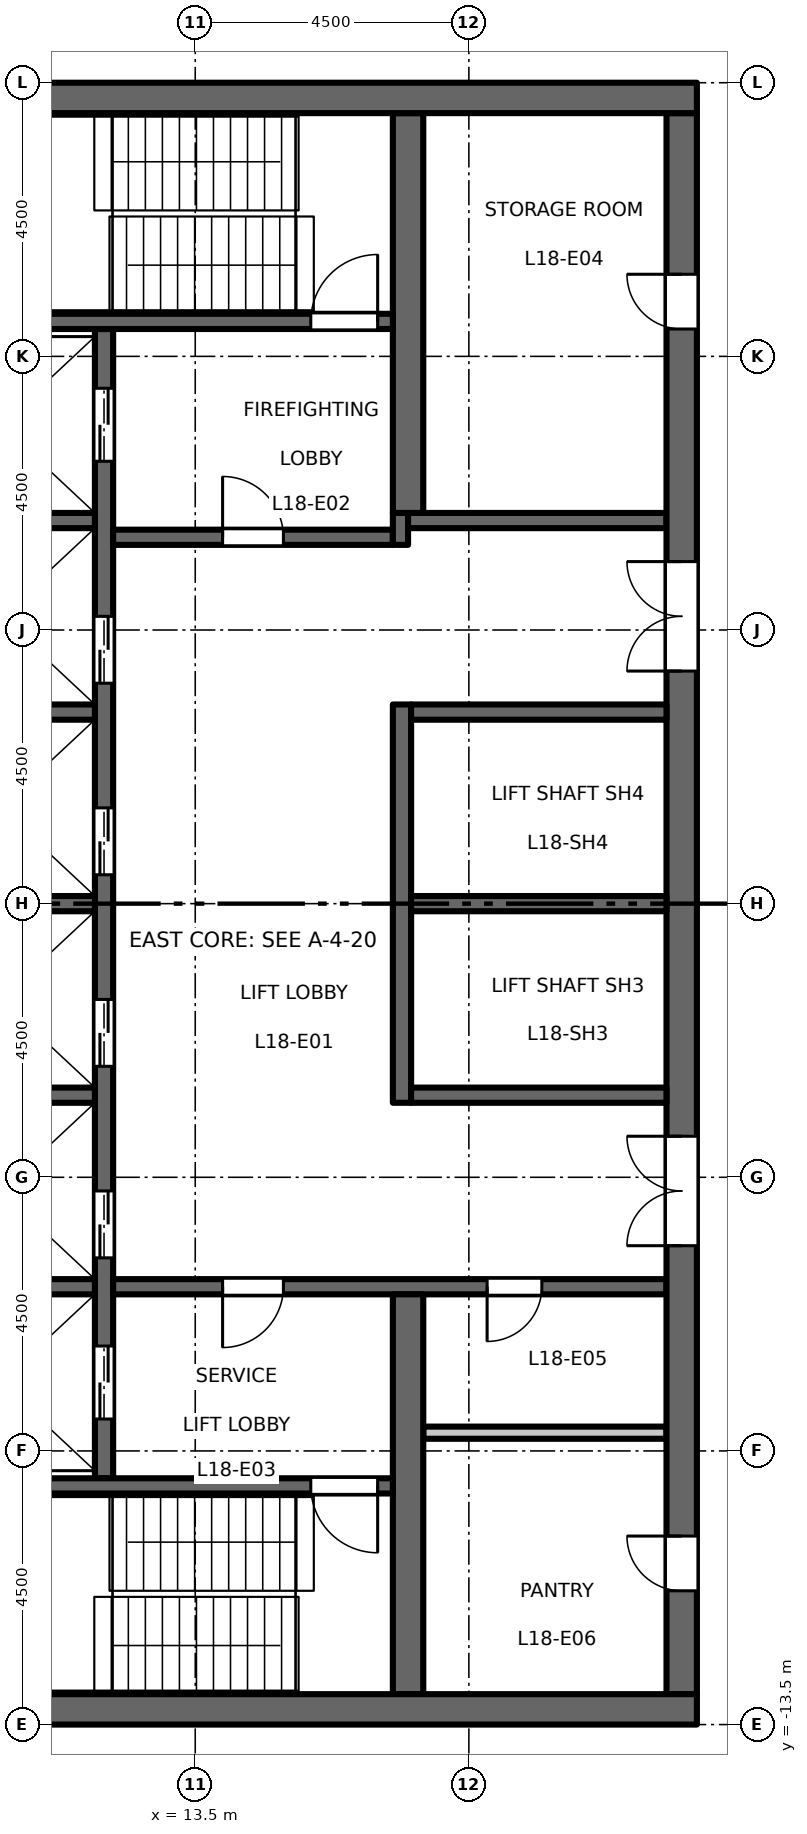
"""IFC4 building model, lengths in metres.
Left out: names, types, materials, properties, quantities, classifications, styles, units other than length and angle.
Written with IfcOpenShell. Run it as: python <this file> out.ifc"""

import sys

from ifc_helpers import new_model, si_unit, direction, frame, frame_2d, origin, place, context, subcontext, project, spatial, rectangle, extrude, element, fill, save


model = new_model("IFC4")
c1 = context("Model", 3, precision=1e-05, world=origin(), true_north=direction((0.0, 1.0)))
c2 = subcontext(c1, "Body", "Model", "MODEL_VIEW")
j1 = project(units=[si_unit("LENGTHUNIT", "METRE"), si_unit("PLANEANGLEUNIT", "RADIAN")], contexts=[c1])
p1 = place(None, origin())
s1 = spatial("IfcSite", under=j1, at=p1, CompositionType="ELEMENT")
p2 = place(p1, origin())
s2 = spatial("IfcBuilding", under=s1, at=p2, CompositionType="ELEMENT")
p3 = place(p2, frame((0.0, 0.0, 85.2)))
s3 = spatial("IfcBuildingStorey", under=s2, at=p3, CompositionType="ELEMENT", Elevation=85.2)
p4 = place(p3, frame((12.0, -9.45, 0.0), z_axis=(0.0, 0.0, 1.0), x_axis=(0.0, 1.0, 0.0)))
e1 = element("IfcWall", 1, at=p4, inside=s3, PredefinedType="SHEAR", context=c2, shape_type="SweptSolid", body=[
    extrude(rectangle(XDim=18.9, YDim=0.3, at=frame_2d((9.45, 0.0))), origin(), (0.0, 0.0, 1.0), 4.35),
])
p5 = place(p4, frame((3.625, 0.0, 0.0)))
e2 = element("IfcOpeningElement", 2, at=p5, cuts=e1, PredefinedType="OPENING", context=c2, shape_type="SweptSolid", body=[
    extrude(rectangle(XDim=1.1, YDim=2.1, at=frame_2d((0.55, 1.05))), frame((0.0, 0.16, 0.0), z_axis=(0.0, -1.0, 0.0), x_axis=(1.0, 0.0, 0.0)), (0.0, 0.0, 1.0), 0.32),
])
p6 = place(p4, frame((6.775, 0.0, 0.0)))
e3 = element("IfcOpeningElement", 3, at=p6, cuts=e1, PredefinedType="OPENING", context=c2, shape_type="SweptSolid", body=[
    extrude(rectangle(XDim=1.1, YDim=2.1, at=frame_2d((0.55, 1.05))), frame((0.0, 0.16, 0.0), z_axis=(0.0, -1.0, 0.0), x_axis=(1.0, 0.0, 0.0)), (0.0, 0.0, 1.0), 0.32),
])
p7 = place(p4, frame((9.925, 0.0, 0.0)))
e4 = element("IfcOpeningElement", 4, at=p7, cuts=e1, PredefinedType="OPENING", context=c2, shape_type="SweptSolid", body=[
    extrude(rectangle(XDim=1.1, YDim=2.1, at=frame_2d((0.55, 1.05))), frame((0.0, 0.16, 0.0), z_axis=(0.0, -1.0, 0.0), x_axis=(1.0, 0.0, 0.0)), (0.0, 0.0, 1.0), 0.32),
])
p8 = place(p4, frame((13.075, 0.0, 0.0)))
e5 = element("IfcOpeningElement", 5, at=p8, cuts=e1, PredefinedType="OPENING", context=c2, shape_type="SweptSolid", body=[
    extrude(rectangle(XDim=1.1, YDim=2.1, at=frame_2d((0.55, 1.05))), frame((0.0, 0.16, 0.0), z_axis=(0.0, -1.0, 0.0), x_axis=(1.0, 0.0, 0.0)), (0.0, 0.0, 1.0), 0.32),
])
p9 = place(p4, frame((16.725, 0.0, 0.0)))
e6 = element("IfcOpeningElement", 6, at=p9, cuts=e1, PredefinedType="OPENING", context=c2, shape_type="SweptSolid", body=[
    extrude(rectangle(XDim=1.2, YDim=2.1, at=frame_2d((0.6, 1.05))), frame((0.0, 0.16, 0.0), z_axis=(0.0, -1.0, 0.0), x_axis=(1.0, 0.0, 0.0)), (0.0, 0.0, 1.0), 0.32),
])
p10 = place(p4, frame((0.975, 0.0, 0.0)))
e7 = element("IfcOpeningElement", 7, at=p10, cuts=e1, PredefinedType="OPENING", context=c2, shape_type="SweptSolid", body=[
    extrude(rectangle(XDim=1.2, YDim=2.1, at=frame_2d((0.6, 1.05))), frame((0.0, 0.16, 0.0), z_axis=(0.0, -1.0, 0.0), x_axis=(1.0, 0.0, 0.0)), (0.0, 0.0, 1.0), 0.32),
])
p11 = place(p3, frame((12.15, 6.025, 0.0), z_axis=(0.0, 0.0, 1.0), x_axis=(1.0, 0.0, 0.0)))
e8 = element("IfcWall", 8, at=p11, inside=s3, PredefinedType="SHEAR", context=c2, shape_type="SweptSolid", body=[
    extrude(rectangle(XDim=4.6, YDim=0.25, at=frame_2d((2.3, 0.0))), origin(), (0.0, 0.0, 1.0), 4.35),
])
p12 = place(p11, frame((1.8, 0.0, 0.0)))
e9 = element("IfcOpeningElement", 9, at=p12, cuts=e8, PredefinedType="OPENING", context=c2, shape_type="SweptSolid", body=[
    extrude(rectangle(XDim=1.0, YDim=2.1, at=frame_2d((0.5, 1.05))), frame((0.0, 0.135, 0.0), z_axis=(0.0, -1.0, 0.0), x_axis=(1.0, 0.0, 0.0)), (0.0, 0.0, 1.0), 0.27),
])
p13 = place(p3, frame((16.875, 5.9, 0.0), z_axis=(0.0, 0.0, 1.0), x_axis=(0.0, 1.0, 0.0)))
e10 = element("IfcWall", 10, at=p13, inside=s3, PredefinedType="SHEAR", context=c2, shape_type="SweptSolid", body=[
    extrude(rectangle(XDim=0.525, YDim=0.25, at=frame_2d((0.263, 0.0))), origin(), (0.0, 0.0, 1.0), 4.35),
])
p14 = place(p3, frame((17.0, 6.3, 0.0), z_axis=(0.0, 0.0, 1.0), x_axis=(1.0, 0.0, 0.0)))
e11 = element("IfcWall", 11, at=p14, inside=s3, PredefinedType="SHEAR", context=c2, shape_type="SweptSolid", body=[
    extrude(rectangle(XDim=4.25, YDim=0.25, at=frame_2d((2.125, 0.0))), origin(), (0.0, 0.0, 1.0), 4.35),
])
p15 = place(p3, frame((12.15, -6.3, 0.0), z_axis=(0.0, 0.0, 1.0), x_axis=(1.0, 0.0, 0.0)))
e12 = element("IfcWall", 12, at=p15, inside=s3, PredefinedType="SHEAR", context=c2, shape_type="SweptSolid", body=[
    extrude(rectangle(XDim=9.1, YDim=0.25, at=frame_2d((4.55, 0.0))), origin(), (0.0, 0.0, 1.0), 4.35),
])
p16 = place(p15, frame((1.8, 0.0, 0.0)))
e13 = element("IfcOpeningElement", 13, at=p16, cuts=e12, PredefinedType="OPENING", context=c2, shape_type="SweptSolid", body=[
    extrude(rectangle(XDim=1.0, YDim=2.1, at=frame_2d((0.5, 1.05))), frame((0.0, 0.135, 0.0), z_axis=(0.0, -1.0, 0.0), x_axis=(1.0, 0.0, 0.0)), (0.0, 0.0, 1.0), 0.27),
])
p17 = place(p15, frame((6.15, 0.0, 0.0)))
e14 = element("IfcOpeningElement", 14, at=p17, cuts=e12, PredefinedType="OPENING", context=c2, shape_type="SweptSolid", body=[
    extrude(rectangle(XDim=0.9, YDim=2.1, at=frame_2d((0.45, 1.05))), frame((0.0, 0.135, 0.0), z_axis=(0.0, -1.0, 0.0), x_axis=(1.0, 0.0, 0.0)), (0.0, 0.0, 1.0), 0.27),
])
p18 = place(p3, frame((21.5, -13.0, 0.0), z_axis=(0.0, 0.0, 1.0), x_axis=(0.0, 1.0, 0.0)))
e15 = element("IfcWall", 15, at=p18, inside=s3, PredefinedType="SHEAR", context=c2, shape_type="SweptSolid", body=[
    extrude(rectangle(XDim=26.0, YDim=0.5, at=frame_2d((13.0, 0.0))), origin(), (0.0, 0.0, 1.0), 4.35),
])
p19 = place(p18, frame((16.825, 0.0, 0.0)))
e16 = element("IfcOpeningElement", 16, at=p19, cuts=e15, PredefinedType="OPENING", context=c2, shape_type="SweptSolid", body=[
    extrude(rectangle(XDim=1.8, YDim=2.1, at=frame_2d((0.9, 1.05))), frame((0.0, 0.26, 0.0), z_axis=(0.0, -1.0, 0.0), x_axis=(1.0, 0.0, 0.0)), (0.0, 0.0, 1.0), 0.52),
])
p20 = place(p18, frame((7.375, 0.0, 0.0)))
e17 = element("IfcOpeningElement", 17, at=p20, cuts=e15, PredefinedType="OPENING", context=c2, shape_type="SweptSolid", body=[
    extrude(rectangle(XDim=1.8, YDim=2.1, at=frame_2d((0.9, 1.05))), frame((0.0, 0.26, 0.0), z_axis=(0.0, -1.0, 0.0), x_axis=(1.0, 0.0, 0.0)), (0.0, 0.0, 1.0), 0.52),
])
p21 = place(p18, frame((22.45, 0.0, 0.0)))
e18 = element("IfcOpeningElement", 18, at=p21, cuts=e15, PredefinedType="OPENING", context=c2, shape_type="SweptSolid", body=[
    extrude(rectangle(XDim=0.9, YDim=2.1, at=frame_2d((0.45, 1.05))), frame((0.0, 0.26, 0.0), z_axis=(0.0, -1.0, 0.0), x_axis=(1.0, 0.0, 0.0)), (0.0, 0.0, 1.0), 0.52),
])
p22 = place(p18, frame((1.7, 0.0, 0.0)))
e19 = element("IfcOpeningElement", 19, at=p22, cuts=e15, PredefinedType="OPENING", context=c2, shape_type="SweptSolid", body=[
    extrude(rectangle(XDim=0.9, YDim=2.1, at=frame_2d((0.45, 1.05))), frame((0.0, 0.26, 0.0), z_axis=(0.0, -1.0, 0.0), x_axis=(1.0, 0.0, 0.0)), (0.0, 0.0, 1.0), 0.52),
])
p23 = place(p3, frame((17.25, -8.7, 0.0), z_axis=(0.0, 0.0, 1.0), x_axis=(1.0, 0.0, 0.0)))
e20 = element("IfcWall", 20, at=p23, inside=s3, PredefinedType="PARTITIONING", context=c2, shape_type="SweptSolid", body=[
    extrude(rectangle(XDim=4.0, YDim=0.2, at=frame_2d((2.0, 0.0))), origin(), (0.0, 0.0, 1.0), 4.35),
])
p24 = place(p3, frame((16.9, -3.275, 0.0), z_axis=(0.0, 0.0, 1.0), x_axis=(0.0, 1.0, 0.0)))
e21 = element("IfcWall", 21, at=p24, inside=s3, PredefinedType="SHEAR", context=c2, shape_type="SweptSolid", body=[
    extrude(rectangle(XDim=6.55, YDim=0.3, at=frame_2d((3.275, 0.0))), origin(), (0.0, 0.0, 1.0), 4.35),
])
for number, where, z_axis, x_axis in (
    (22, (17.05, 0.0, 0.0), (0.0, 0.0, 1.0), (1.0, 0.0, 0.0)),
    (23, (17.05, 3.15, 0.0), (0.0, 0.0, 1.0), (1.0, 0.0, 0.0)),
    (24, (17.05, -3.15, 0.0), (0.0, 0.0, 1.0), (1.0, 0.0, 0.0)),
):
    element("IfcWall", number, at=place(p3, frame(where, z_axis=z_axis, x_axis=x_axis)), inside=s3, PredefinedType="SHEAR", context=c2, shape_type="SweptSolid", body=[
        extrude(rectangle(XDim=4.2, YDim=0.25, at=frame_2d((2.1, 0.0))), origin(), (0.0, 0.0, 1.0), 4.35),
    ])
for number, where, z_axis, x_axis in (
    (25, (17.0, 6.425, 0.0), (0.0, 0.0, 1.0), (0.0, 1.0, 0.0)),
    (26, (17.0, -13.0, 0.0), (0.0, 0.0, 1.0), (0.0, 1.0, 0.0)),
):
    element("IfcWall", number, at=place(p3, frame(where, z_axis=z_axis, x_axis=x_axis)), inside=s3, PredefinedType="SHEAR", context=c2, shape_type="SweptSolid", body=[
        extrude(rectangle(XDim=6.575, YDim=0.5, at=frame_2d((3.288, 0.0))), origin(), (0.0, 0.0, 1.0), 4.35),
    ])
for number, where, z_axis, x_axis in (
    (27, (8.75, 0.0, 0.0), (0.0, 0.0, 1.0), (1.0, 0.0, 0.0)),
    (28, (8.75, 3.15, 0.0), (0.0, 0.0, 1.0), (1.0, 0.0, 0.0)),
    (29, (8.75, 6.3, 0.0), (0.0, 0.0, 1.0), (1.0, 0.0, 0.0)),
    (30, (8.75, -3.15, 0.0), (0.0, 0.0, 1.0), (1.0, 0.0, 0.0)),
    (31, (8.75, -6.3, 0.0), (0.0, 0.0, 1.0), (1.0, 0.0, 0.0)),
):
    element("IfcWall", number, at=place(p3, frame(where, z_axis=z_axis, x_axis=x_axis)), inside=s3, PredefinedType="SHEAR", context=c2, shape_type="SweptSolid", body=[
        extrude(rectangle(XDim=3.1, YDim=0.25, at=frame_2d((1.55, 0.0))), origin(), (0.0, 0.0, 1.0), 4.35),
    ])
p25 = place(p3, frame((8.75, 9.575, 0.0), z_axis=(0.0, 0.0, 1.0), x_axis=(1.0, 0.0, 0.0)))
e32 = element("IfcWall", 32, at=p25, inside=s3, PredefinedType="SHEAR", context=c2, shape_type="SweptSolid", body=[
    extrude(rectangle(XDim=8.0, YDim=0.25, at=frame_2d((4.0, 0.0))), origin(), (0.0, 0.0, 1.0), 4.35),
])
p26 = place(p25, frame((6.65, 0.0, 0.0)))
e33 = element("IfcOpeningElement", 33, at=p26, cuts=e32, PredefinedType="OPENING", context=c2, shape_type="SweptSolid", body=[
    extrude(rectangle(XDim=1.1, YDim=2.1, at=frame_2d((0.55, 1.05))), frame((0.0, 0.135, 0.0), z_axis=(0.0, -1.0, 0.0), x_axis=(1.0, 0.0, 0.0)), (0.0, 0.0, 1.0), 0.27),
])
p27 = place(p3, frame((8.75, -9.575, 0.0), z_axis=(0.0, 0.0, 1.0), x_axis=(1.0, 0.0, 0.0)))
e34 = element("IfcWall", 34, at=p27, inside=s3, PredefinedType="SHEAR", context=c2, shape_type="SweptSolid", body=[
    extrude(rectangle(XDim=8.0, YDim=0.25, at=frame_2d((4.0, 0.0))), origin(), (0.0, 0.0, 1.0), 4.35),
])
p28 = place(p27, frame((6.65, 0.0, 0.0)))
e35 = element("IfcOpeningElement", 35, at=p28, cuts=e34, PredefinedType="OPENING", context=c2, shape_type="SweptSolid", body=[
    extrude(rectangle(XDim=1.1, YDim=2.1, at=frame_2d((0.55, 1.05))), frame((0.0, 0.135, 0.0), z_axis=(0.0, -1.0, 0.0), x_axis=(1.0, 0.0, 0.0)), (0.0, 0.0, 1.0), 0.27),
])
for number, where, z_axis, x_axis in (
    (36, (8.25, 13.25, 0.0), (0.0, 0.0, 1.0), (1.0, 0.0, 0.0)),
    (37, (8.25, -13.25, 0.0), (0.0, 0.0, 1.0), (1.0, 0.0, 0.0)),
):
    element("IfcWall", number, at=place(p3, frame(where, z_axis=z_axis, x_axis=x_axis)), inside=s3, PredefinedType="SHEAR", context=c2, shape_type="SweptSolid", body=[
        extrude(rectangle(XDim=13.5, YDim=0.5, at=frame_2d((6.75, 0.0))), origin(), (0.0, 0.0, 1.0), 4.35),
    ])
p29 = place(p12, origin())
e38 = element("IfcDoor", 38, at=p29, inside=s3, OperationType="SINGLE_SWING_RIGHT", PredefinedType="DOOR", context=c2, shape_type="SweptSolid", body=[
    extrude(rectangle(XDim=1.0, YDim=2.1, at=frame_2d((0.5, 1.05))), frame((0.0, 0.025, 0.0), z_axis=(0.0, -1.0, 0.0), x_axis=(1.0, 0.0, 0.0)), (0.0, 0.0, 1.0), 0.05),
])
fill(e9, e38)
p30 = place(p16, origin())
e39 = element("IfcDoor", 39, at=p30, inside=s3, OperationType="SINGLE_SWING_LEFT", PredefinedType="DOOR", context=c2, shape_type="SweptSolid", body=[
    extrude(rectangle(XDim=1.0, YDim=2.1, at=frame_2d((0.5, 1.05))), frame((0.0, 0.025, 0.0), z_axis=(0.0, -1.0, 0.0), x_axis=(1.0, 0.0, 0.0)), (0.0, 0.0, 1.0), 0.05),
])
fill(e13, e39)
p31 = place(p26, origin())
e40 = element("IfcDoor", 40, at=p31, inside=s3, OperationType="SINGLE_SWING_LEFT", PredefinedType="DOOR", context=c2, shape_type="SweptSolid", body=[
    extrude(rectangle(XDim=1.1, YDim=2.1, at=frame_2d((0.55, 1.05))), frame((0.0, 0.025, 0.0), z_axis=(0.0, -1.0, 0.0), x_axis=(1.0, 0.0, 0.0)), (0.0, 0.0, 1.0), 0.05),
])
fill(e33, e40)
p32 = place(p28, origin())
e41 = element("IfcDoor", 41, at=p32, inside=s3, OperationType="SINGLE_SWING_RIGHT", PredefinedType="DOOR", context=c2, shape_type="SweptSolid", body=[
    extrude(rectangle(XDim=1.1, YDim=2.1, at=frame_2d((0.55, 1.05))), frame((0.0, 0.025, 0.0), z_axis=(0.0, -1.0, 0.0), x_axis=(1.0, 0.0, 0.0)), (0.0, 0.0, 1.0), 0.05),
])
fill(e35, e41)
p33 = place(p19, origin())
e42 = element("IfcDoor", 42, at=p33, inside=s3, OperationType="DOUBLE_DOOR_DOUBLE_SWING", PredefinedType="DOOR", context=c2, shape_type="SweptSolid", body=[
    extrude(rectangle(XDim=1.8, YDim=2.1, at=frame_2d((0.9, 1.05))), frame((0.0, 0.025, 0.0), z_axis=(0.0, -1.0, 0.0), x_axis=(1.0, 0.0, 0.0)), (0.0, 0.0, 1.0), 0.05),
])
fill(e16, e42)
p34 = place(p20, origin())
e43 = element("IfcDoor", 43, at=p34, inside=s3, OperationType="DOUBLE_DOOR_DOUBLE_SWING", PredefinedType="DOOR", context=c2, shape_type="SweptSolid", body=[
    extrude(rectangle(XDim=1.8, YDim=2.1, at=frame_2d((0.9, 1.05))), frame((0.0, 0.025, 0.0), z_axis=(0.0, -1.0, 0.0), x_axis=(1.0, 0.0, 0.0)), (0.0, 0.0, 1.0), 0.05),
])
fill(e17, e43)
p35 = place(p5, origin())
e44 = element("IfcDoor", 44, at=p35, inside=s3, OperationType="DOUBLE_DOOR_SLIDING", PredefinedType="DOOR", context=c2, shape_type="SweptSolid", body=[
    extrude(rectangle(XDim=1.1, YDim=2.1, at=frame_2d((0.55, 1.05))), frame((0.0, 0.025, 0.0), z_axis=(0.0, -1.0, 0.0), x_axis=(1.0, 0.0, 0.0)), (0.0, 0.0, 1.0), 0.05),
])
fill(e2, e44)
p36 = place(p6, origin())
e45 = element("IfcDoor", 45, at=p36, inside=s3, OperationType="DOUBLE_DOOR_SLIDING", PredefinedType="DOOR", context=c2, shape_type="SweptSolid", body=[
    extrude(rectangle(XDim=1.1, YDim=2.1, at=frame_2d((0.55, 1.05))), frame((0.0, 0.025, 0.0), z_axis=(0.0, -1.0, 0.0), x_axis=(1.0, 0.0, 0.0)), (0.0, 0.0, 1.0), 0.05),
])
fill(e3, e45)
p37 = place(p7, origin())
e46 = element("IfcDoor", 46, at=p37, inside=s3, OperationType="DOUBLE_DOOR_SLIDING", PredefinedType="DOOR", context=c2, shape_type="SweptSolid", body=[
    extrude(rectangle(XDim=1.1, YDim=2.1, at=frame_2d((0.55, 1.05))), frame((0.0, 0.025, 0.0), z_axis=(0.0, -1.0, 0.0), x_axis=(1.0, 0.0, 0.0)), (0.0, 0.0, 1.0), 0.05),
])
fill(e4, e46)
p38 = place(p8, origin())
e47 = element("IfcDoor", 47, at=p38, inside=s3, OperationType="DOUBLE_DOOR_SLIDING", PredefinedType="DOOR", context=c2, shape_type="SweptSolid", body=[
    extrude(rectangle(XDim=1.1, YDim=2.1, at=frame_2d((0.55, 1.05))), frame((0.0, 0.025, 0.0), z_axis=(0.0, -1.0, 0.0), x_axis=(1.0, 0.0, 0.0)), (0.0, 0.0, 1.0), 0.05),
])
fill(e5, e47)
p39 = place(p9, origin())
e48 = element("IfcDoor", 48, at=p39, inside=s3, OperationType="DOUBLE_DOOR_SLIDING", PredefinedType="DOOR", context=c2, shape_type="SweptSolid", body=[
    extrude(rectangle(XDim=1.2, YDim=2.1, at=frame_2d((0.6, 1.05))), frame((0.0, 0.025, 0.0), z_axis=(0.0, -1.0, 0.0), x_axis=(1.0, 0.0, 0.0)), (0.0, 0.0, 1.0), 0.05),
])
fill(e6, e48)
p40 = place(p10, origin())
e49 = element("IfcDoor", 49, at=p40, inside=s3, OperationType="DOUBLE_DOOR_SLIDING", PredefinedType="DOOR", context=c2, shape_type="SweptSolid", body=[
    extrude(rectangle(XDim=1.2, YDim=2.1, at=frame_2d((0.6, 1.05))), frame((0.0, 0.025, 0.0), z_axis=(0.0, -1.0, 0.0), x_axis=(1.0, 0.0, 0.0)), (0.0, 0.0, 1.0), 0.05),
])
fill(e7, e49)
p41 = place(p21, origin())
e50 = element("IfcDoor", 50, at=p41, inside=s3, OperationType="SINGLE_SWING_LEFT", PredefinedType="DOOR", context=c2, shape_type="SweptSolid", body=[
    extrude(rectangle(XDim=0.9, YDim=2.1, at=frame_2d((0.45, 1.05))), frame((0.0, 0.025, 0.0), z_axis=(0.0, -1.0, 0.0), x_axis=(1.0, 0.0, 0.0)), (0.0, 0.0, 1.0), 0.05),
])
fill(e18, e50)
p42 = place(p17, origin())
e51 = element("IfcDoor", 51, at=p42, inside=s3, OperationType="SINGLE_SWING_LEFT", PredefinedType="DOOR", context=c2, shape_type="SweptSolid", body=[
    extrude(rectangle(XDim=0.9, YDim=2.1, at=frame_2d((0.45, 1.05))), frame((0.0, 0.025, 0.0), z_axis=(0.0, -1.0, 0.0), x_axis=(1.0, 0.0, 0.0)), (0.0, 0.0, 1.0), 0.05),
])
fill(e14, e51)
p43 = place(p22, origin())
e52 = element("IfcDoor", 52, at=p43, inside=s3, OperationType="SINGLE_SWING_LEFT", PredefinedType="DOOR", context=c2, shape_type="SweptSolid", body=[
    extrude(rectangle(XDim=0.9, YDim=2.1, at=frame_2d((0.45, 1.05))), frame((0.0, 0.025, 0.0), z_axis=(0.0, -1.0, 0.0), x_axis=(1.0, 0.0, 0.0)), (0.0, 0.0, 1.0), 0.05),
])
fill(e19, e52)
save(model, sys.argv[1])
